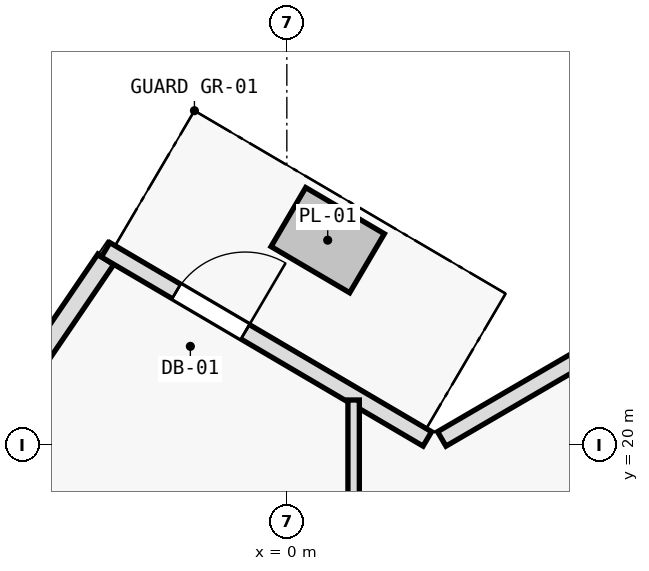
"""IFC4 building model, lengths in metres.
Left out: names, types, materials, properties, quantities, classifications, styles, units other than length and angle.
Written with IfcOpenShell. Run it as: python <this file> out.ifc"""

import sys

from ifc_helpers import new_model, si_unit, direction, frame, frame_2d, origin, place, context, subcontext, project, spatial, rectangle, extrude, element, fill, save


model = new_model("IFC4")
c1 = context("Model", 3, precision=1e-05, world=origin(), true_north=direction((0.0, 1.0)))
c2 = subcontext(c1, "Body", "Model", "MODEL_VIEW")
j1 = project(units=[si_unit("LENGTHUNIT", "METRE"), si_unit("PLANEANGLEUNIT", "RADIAN")], contexts=[c1])
p1 = place(None, origin())
s1 = spatial("IfcSite", under=j1, at=p1, CompositionType="ELEMENT")
p2 = place(p1, origin())
s2 = spatial("IfcBuilding", under=s1, at=p2, CompositionType="ELEMENT")
p3 = place(p2, frame((0.0, 0.0, 156.6)))
s3 = spatial("IfcBuildingStorey", under=s2, at=p3, CompositionType="ELEMENT", Elevation=156.6)
p4 = place(p3, frame((-8.75, 13.081, 0.0), z_axis=(0.0, 0.0, 1.0), x_axis=(0.562463958751, 0.82682180372, 0.0)))
e1 = element("IfcWall", 1, at=p4, inside=s3, PredefinedType="SOLIDWALL", context=c2, shape_type="SweptSolid", body=[
    extrude(rectangle(XDim=11.322, YDim=0.25, at=frame_2d((5.661, 0.0))), origin(), (0.0, 0.0, 1.0), 3.35),
])
p5 = place(p4, frame((5.061, 0.0, 0.62)))
e2 = element("IfcOpeningElement", 2, at=p5, cuts=e1, PredefinedType="OPENING", context=c2, shape_type="SweptSolid", body=[
    extrude(rectangle(XDim=1.2, YDim=1.8, at=frame_2d((0.6, 0.9))), frame((0.0, 0.135, 0.0), z_axis=(0.0, -1.0, 0.0), x_axis=(1.0, 0.0, 0.0)), (0.0, 0.0, 1.0), 0.27),
])
p6 = place(p3, frame((2.039, 20.079, 0.0), z_axis=(0.0, 0.0, 1.0), x_axis=(0.86398603623, 0.503515768571, 0.0)))
e3 = element("IfcWall", 3, at=p6, inside=s3, PredefinedType="SOLIDWALL", context=c2, shape_type="SweptSolid", body=[
    extrude(rectangle(XDim=4.444, YDim=0.22, at=frame_2d((2.222, 0.0))), origin(), (0.0, 0.0, 1.0), 3.35),
])
p7 = place(p3, frame((-2.385, 22.567, 0.0), z_axis=(0.0, 0.0, 1.0), x_axis=(0.8621258938, -0.506694131839, 0.0)))
e4 = element("IfcWall", 4, at=p7, inside=s3, PredefinedType="SOLIDWALL", context=c2, shape_type="SweptSolid", body=[
    extrude(rectangle(XDim=4.91, YDim=0.22, at=frame_2d((2.455, 0.0))), origin(), (0.0, 0.0, 1.0), 3.35),
])
p8 = place(p7, frame((1.08, 0.0, 0.0)))
e5 = element("IfcOpeningElement", 5, at=p8, cuts=e4, PredefinedType="OPENING", context=c2, shape_type="SweptSolid", body=[
    extrude(rectangle(XDim=1.05, YDim=2.15, at=frame_2d((0.525, 1.075))), frame((0.0, 0.12, 0.0), z_axis=(0.0, -1.0, 0.0), x_axis=(1.0, 0.0, 0.0)), (0.0, 0.0, 1.0), 0.24),
])
p9 = place(p3, frame((0.879, 12.42, 0.0), z_axis=(0.0, 0.0, 1.0), x_axis=(0.0, 1.0, 0.0)))
e6 = element("IfcWall", 6, at=p9, inside=s3, PredefinedType="PARTITIONING", context=c2, shape_type="SweptSolid", body=[
    extrude(rectangle(XDim=8.171, YDim=0.15, at=frame_2d((4.086, 0.0))), origin(), (0.0, 0.0, 1.0), 2.885),
])
p10 = place(p8, origin())
e7 = element("IfcDoor", 7, at=p10, inside=s3, OperationType="SINGLE_SWING_RIGHT", PredefinedType="DOOR", context=c2, shape_type="SweptSolid", body=[
    extrude(rectangle(XDim=1.05, YDim=2.15, at=frame_2d((0.525, 1.075))), frame((0.0, 0.025, 0.0), z_axis=(0.0, -1.0, 0.0), x_axis=(1.0, 0.0, 0.0)), (0.0, 0.0, 1.0), 0.05),
])
fill(e5, e7)
save(model, sys.argv[1])
